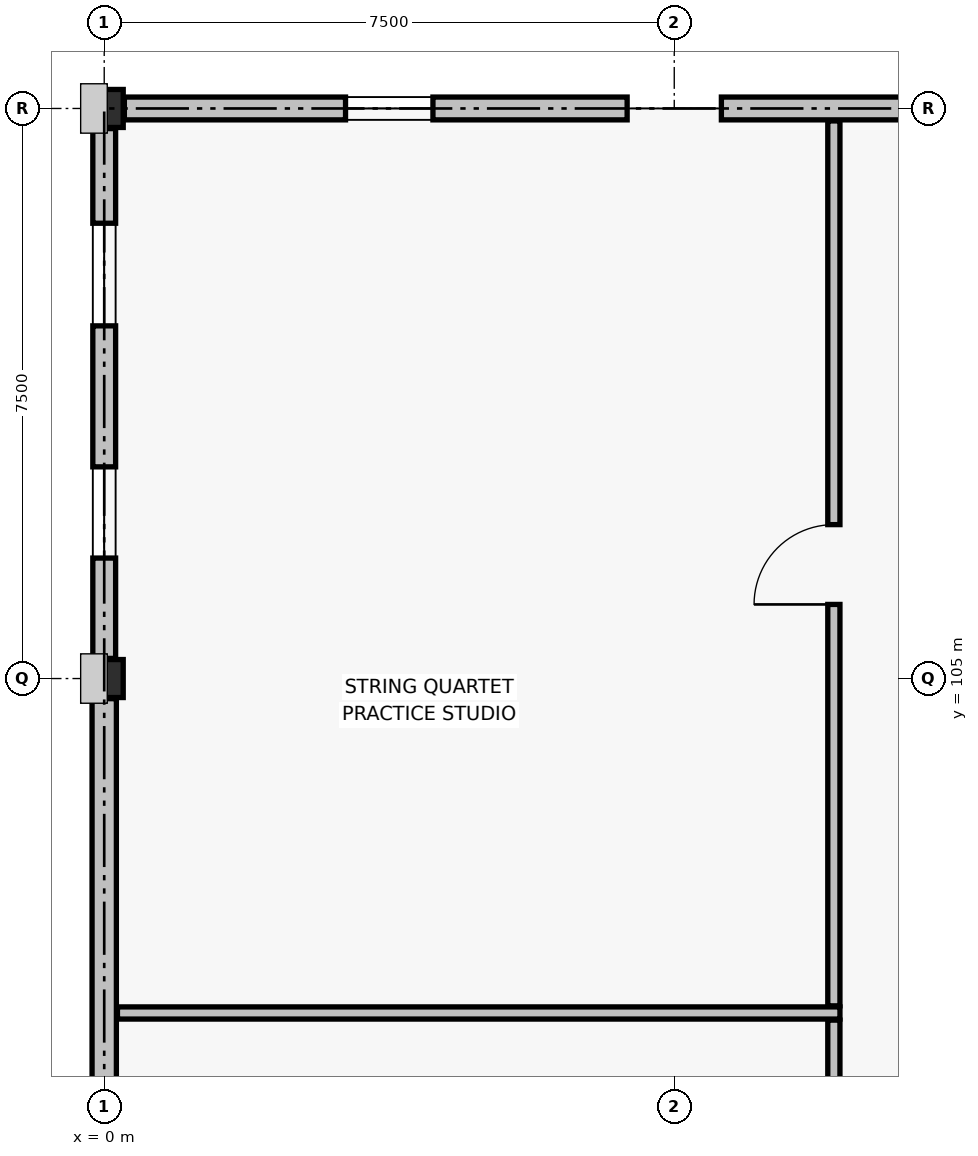
"""IFC4 building model, lengths in metres.
Left out: names, types, materials, properties, quantities, classifications, styles, units other than length and angle.
Written with IfcOpenShell. Run it as: python <this file> out.ifc"""

import sys

from ifc_helpers import new_model, si_unit, direction, frame, frame_2d, origin, origin_2d, place, context, subcontext, project, spatial, rectangle, extrude, element, fill, save


model = new_model("IFC4")
c1 = context("Model", 3, precision=1e-05, world=origin(), true_north=direction((0.0, 1.0)))
c2 = subcontext(c1, "Body", "Model", "MODEL_VIEW")
j1 = project(units=[si_unit("LENGTHUNIT", "METRE"), si_unit("PLANEANGLEUNIT", "RADIAN")], contexts=[c1])
p1 = place(None, origin())
s1 = spatial("IfcSite", under=j1, at=p1, CompositionType="ELEMENT")
p2 = place(p1, origin())
s2 = spatial("IfcBuilding", under=s1, at=p2, CompositionType="ELEMENT")
p3 = place(p2, frame((0.0, 0.0, 17.1)))
s3 = spatial("IfcBuildingStorey", under=s2, at=p3, CompositionType="ELEMENT", Elevation=17.1)
for number, where, z_axis, x_axis in (
    (1, (0.0, 105.0, 0.0), (0.0, 0.0, 1.0), (1.0, 0.0, 0.0)),
    (2, (0.0, 112.5, 0.0), (0.0, 0.0, 1.0), (1.0, 0.0, 0.0)),
):
    element("IfcColumn", number, at=place(p3, frame(where, z_axis=z_axis, x_axis=x_axis)), inside=s3, PredefinedType="COLUMN", context=c2, shape_type="SweptSolid", body=[
        extrude(rectangle(XDim=0.5, YDim=0.5, at=origin_2d()), origin(), (0.0, 0.0, 1.0), 3.9),
    ])
p4 = place(p3, frame((0.265, 112.5, 0.0), z_axis=(0.0, 0.0, 1.0), x_axis=(1.0, 0.0, 0.0)))
e3 = element("IfcWall", 3, at=p4, inside=s3, PredefinedType="SOLIDWALL", context=c2, shape_type="SweptSolid", body=[
    extrude(rectangle(XDim=6.615, YDim=0.3, at=frame_2d((3.308, 0.0))), origin(), (0.0, 0.0, 1.0), 2.59),
])
p5 = place(p4, frame((2.91, 0.0, 0.6)))
e4 = element("IfcOpeningElement", 4, at=p5, cuts=e3, PredefinedType="OPENING", context=c2, shape_type="SweptSolid", body=[
    extrude(rectangle(XDim=1.15, YDim=1.3, at=frame_2d((0.575, 0.65))), frame((0.0, 0.16, 0.0), z_axis=(0.0, -1.0, 0.0), x_axis=(1.0, 0.0, 0.0)), (0.0, 0.0, 1.0), 0.32),
])
p6 = place(p3, frame((8.12, 112.5, 0.0), z_axis=(0.0, 0.0, 1.0), x_axis=(1.0, 0.0, 0.0)))
e5 = element("IfcWall", 5, at=p6, inside=s3, PredefinedType="SOLIDWALL", context=c2, shape_type="SweptSolid", body=[
    extrude(rectangle(XDim=6.615, YDim=0.3, at=frame_2d((3.308, 0.0))), origin(), (0.0, 0.0, 1.0), 2.59),
])
p7 = place(p6, frame((2.48, 0.0, 0.6)))
e6 = element("IfcOpeningElement", 6, at=p7, cuts=e5, PredefinedType="OPENING", context=c2, shape_type="SweptSolid", body=[
    extrude(rectangle(XDim=1.3, YDim=1.3, at=frame_2d((0.65, 0.65))), frame((0.0, 0.16, 0.0), z_axis=(0.0, -1.0, 0.0), x_axis=(1.0, 0.0, 0.0)), (0.0, 0.0, 1.0), 0.32),
])
p8 = place(p3, frame((0.0, 97.765, 0.0), z_axis=(0.0, 0.0, 1.0), x_axis=(0.0, 1.0, 0.0)))
e7 = element("IfcWall", 7, at=p8, inside=s3, PredefinedType="SOLIDWALL", context=c2, shape_type="SweptSolid", body=[
    extrude(rectangle(XDim=6.97, YDim=0.32, at=frame_2d((3.485, 0.0))), origin(), (0.0, 0.0, 1.0), 2.59),
])
p9 = place(p3, frame((0.0, 105.265, 0.0), z_axis=(0.0, 0.0, 1.0), x_axis=(0.0, 1.0, 0.0)))
e8 = element("IfcWall", 8, at=p9, inside=s3, PredefinedType="SOLIDWALL", context=c2, shape_type="SweptSolid", body=[
    extrude(rectangle(XDim=6.97, YDim=0.3, at=frame_2d((3.485, 0.0))), origin(), (0.0, 0.0, 1.0), 2.59),
])
p10 = place(p9, frame((1.32, 0.0, 0.6)))
e9 = element("IfcOpeningElement", 9, at=p10, cuts=e8, PredefinedType="OPENING", context=c2, shape_type="SweptSolid", body=[
    extrude(rectangle(XDim=1.2, YDim=1.2, at=frame_2d((0.6, 0.6))), frame((0.0, 0.16, 0.0), z_axis=(0.0, -1.0, 0.0), x_axis=(1.0, 0.0, 0.0)), (0.0, 0.0, 1.0), 0.32),
])
p11 = place(p9, frame((4.375, 0.0, 0.6)))
e10 = element("IfcOpeningElement", 10, at=p11, cuts=e8, PredefinedType="OPENING", context=c2, shape_type="SweptSolid", body=[
    extrude(rectangle(XDim=1.35, YDim=1.15, at=frame_2d((0.675, 0.575))), frame((0.0, 0.16, 0.0), z_axis=(0.0, -1.0, 0.0), x_axis=(1.0, 0.0, 0.0)), (0.0, 0.0, 1.0), 0.32),
])
p12 = place(p3, frame((0.174, 100.6, 0.0), z_axis=(0.0, 0.0, 1.0), x_axis=(1.0, 0.0, 0.0)))
e11 = element("IfcWall", 11, at=p12, inside=s3, PredefinedType="PARTITIONING", context=c2, shape_type="SweptSolid", body=[
    extrude(rectangle(XDim=9.506, YDim=0.16, at=frame_2d((4.753, 0.0))), origin(), (0.0, 0.0, 1.0), 2.97),
])
p13 = place(p3, frame((9.6, 97.594, 0.0), z_axis=(0.0, 0.0, 1.0), x_axis=(0.0, 1.0, 0.0)))
e12 = element("IfcWall", 12, at=p13, inside=s3, PredefinedType="PARTITIONING", context=c2, shape_type="SweptSolid", body=[
    extrude(rectangle(XDim=2.912, YDim=0.16, at=frame_2d((1.456, 0.0))), origin(), (0.0, 0.0, 1.0), 2.59),
])
p14 = place(p13, frame((0.981, 0.0, 0.0)))
e13 = element("IfcOpeningElement", 13, at=p14, cuts=e12, PredefinedType="OPENING", context=c2, shape_type="SweptSolid", body=[
    extrude(rectangle(XDim=0.95, YDim=2.1, at=frame_2d((0.475, 1.05))), frame((0.0, 0.09, 0.0), z_axis=(0.0, -1.0, 0.0), x_axis=(1.0, 0.0, 0.0)), (0.0, 0.0, 1.0), 0.18),
])
p15 = place(p3, frame((9.6, 100.694, 0.0), z_axis=(0.0, 0.0, 1.0), x_axis=(0.0, 1.0, 0.0)))
e14 = element("IfcWall", 14, at=p15, inside=s3, PredefinedType="PARTITIONING", context=c2, shape_type="SweptSolid", body=[
    extrude(rectangle(XDim=11.642, YDim=0.16, at=frame_2d((5.821, 0.0))), origin(), (0.0, 0.0, 1.0), 2.59),
])
p16 = place(p15, frame((5.281, 0.0, 0.0)))
e15 = element("IfcOpeningElement", 15, at=p16, cuts=e14, PredefinedType="OPENING", context=c2, shape_type="SweptSolid", body=[
    extrude(rectangle(XDim=1.05, YDim=2.12, at=frame_2d((0.525, 1.06))), frame((0.0, 0.09, 0.0), z_axis=(0.0, -1.0, 0.0), x_axis=(1.0, 0.0, 0.0)), (0.0, 0.0, 1.0), 0.18),
])
p17 = place(p5, origin())
e16 = element("IfcWindow", 16, at=p17, inside=s3, PartitioningType="SINGLE_PANEL", PredefinedType="WINDOW", context=c2, shape_type="SweptSolid", body=[
    extrude(rectangle(XDim=1.15, YDim=1.3, at=frame_2d((0.575, 0.65))), frame((0.0, 0.03, 0.0), z_axis=(0.0, -1.0, 0.0), x_axis=(1.0, 0.0, 0.0)), (0.0, 0.0, 1.0), 0.06),
])
fill(e4, e16)
p18 = place(p10, origin())
e17 = element("IfcWindow", 17, at=p18, inside=s3, PartitioningType="SINGLE_PANEL", PredefinedType="WINDOW", context=c2, shape_type="SweptSolid", body=[
    extrude(rectangle(XDim=1.2, YDim=1.2, at=frame_2d((0.6, 0.6))), frame((0.0, 0.03, 0.0), z_axis=(0.0, -1.0, 0.0), x_axis=(1.0, 0.0, 0.0)), (0.0, 0.0, 1.0), 0.06),
])
fill(e9, e17)
p19 = place(p11, origin())
e18 = element("IfcWindow", 18, at=p19, inside=s3, PartitioningType="SINGLE_PANEL", PredefinedType="WINDOW", context=c2, shape_type="SweptSolid", body=[
    extrude(rectangle(XDim=1.35, YDim=1.15, at=frame_2d((0.675, 0.575))), frame((0.0, 0.03, 0.0), z_axis=(0.0, -1.0, 0.0), x_axis=(1.0, 0.0, 0.0)), (0.0, 0.0, 1.0), 0.06),
])
fill(e10, e18)
p20 = place(p16, origin())
e19 = element("IfcDoor", 19, at=p20, inside=s3, OperationType="SINGLE_SWING_LEFT", PredefinedType="DOOR", context=c2, shape_type="SweptSolid", body=[
    extrude(rectangle(XDim=1.05, YDim=2.12, at=frame_2d((0.525, 1.06))), frame((0.0, 0.025, 0.0), z_axis=(0.0, -1.0, 0.0), x_axis=(1.0, 0.0, 0.0)), (0.0, 0.0, 1.0), 0.05),
])
fill(e15, e19)
save(model, sys.argv[1])
